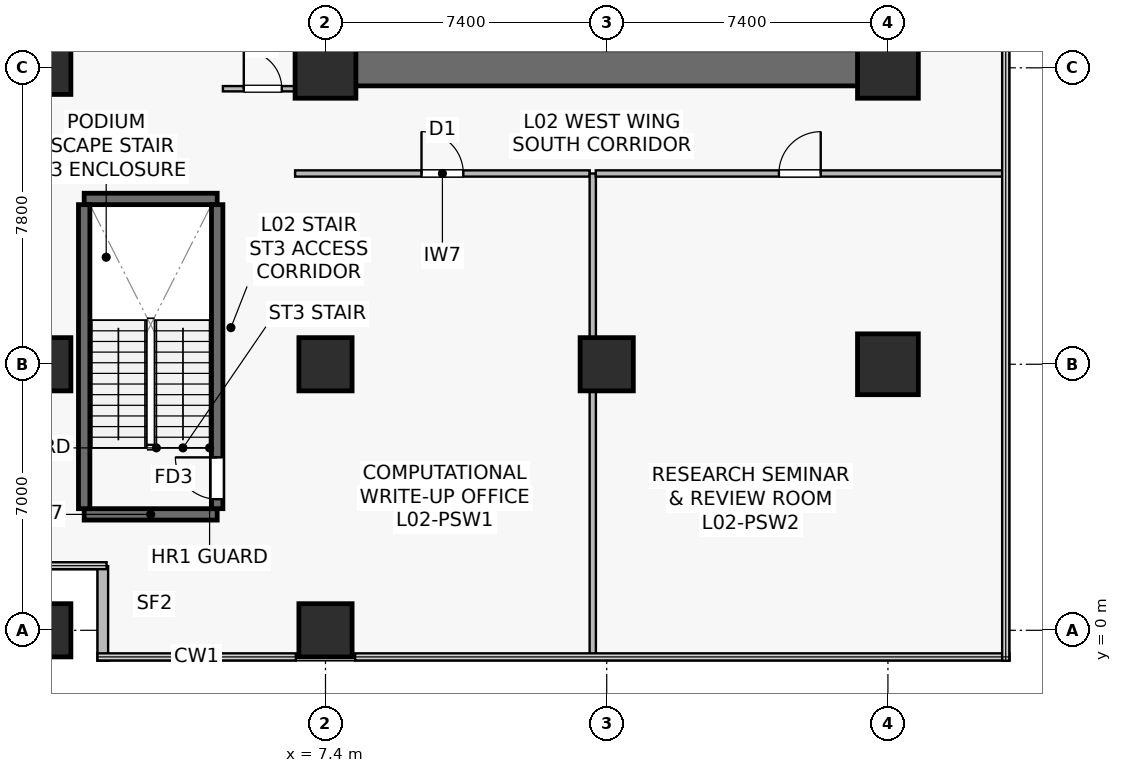
"""IFC4 building model, lengths in metres.
Left out: names, types, materials, properties, quantities, classifications, styles, units other than length and angle.
Written with IfcOpenShell. Run it as: python <this file> out.ifc"""

import sys

from ifc_helpers import new_model, si_unit, direction, frame, frame_2d, origin, origin_2d, place, context, subcontext, project, spatial, rectangle, extrude, source, transform, mapped, element, fill, save


model = new_model("IFC4")
c1 = context("Model", 3, precision=1e-05, world=origin(), true_north=direction((0.0, 1.0)))
c2 = subcontext(c1, "Body", "Model", "MODEL_VIEW")
j1 = project(units=[si_unit("LENGTHUNIT", "METRE"), si_unit("PLANEANGLEUNIT", "RADIAN")], contexts=[c1])
p1 = place(None, origin())
s1 = spatial("IfcSite", under=j1, at=p1, CompositionType="ELEMENT")
p2 = place(p1, origin())
s2 = spatial("IfcBuilding", under=s1, at=p2, CompositionType="ELEMENT")
p3 = place(p2, frame((0.0, 0.0, 5.4)))
s3 = spatial("IfcBuildingStorey", under=s2, at=p3, CompositionType="ELEMENT", Elevation=5.4)
p4 = place(p3, frame((6.925, 14.8, 0.0), z_axis=(0.0, 0.0, 1.0), x_axis=(1.0, 0.0, 0.0)))
e1 = element("IfcWall", 1, at=p4, inside=s3, PredefinedType="SHEAR", context=c2, shape_type="SweptSolid", body=[
    extrude(rectangle(XDim=15.75, YDim=0.95, at=frame_2d((7.875, 0.0))), origin(), (0.0, 0.0, 1.0), 4.45),
])
for number, where, z_axis, x_axis in (
    (2, (1.05, 3.05, 0.0), (0.0, 0.0, 1.0), (1.0, 0.0, 0.0)),
    (3, (1.05, 11.35, 0.0), (0.0, 0.0, 1.0), (1.0, 0.0, 0.0)),
):
    element("IfcWall", number, at=place(p3, frame(where, z_axis=z_axis, x_axis=x_axis)), inside=s3, PredefinedType="SHEAR", context=c2, shape_type="SweptSolid", body=[
        extrude(rectangle(XDim=3.5, YDim=0.3, at=frame_2d((1.75, 0.0))), origin(), (0.0, 0.0, 1.0), 4.45),
    ])
p5 = place(p3, frame((1.05, 3.2, 0.0), z_axis=(0.0, 0.0, 1.0), x_axis=(0.0, 1.0, 0.0)))
e4 = element("IfcWall", 4, at=p5, inside=s3, PredefinedType="SHEAR", context=c2, shape_type="SweptSolid", body=[
    extrude(rectangle(XDim=8.0, YDim=0.3, at=frame_2d((4.0, 0.0))), origin(), (0.0, 0.0, 1.0), 4.45),
])
p6 = place(p3, frame((4.55, 3.2, 0.0), z_axis=(0.0, 0.0, 1.0), x_axis=(0.0, 1.0, 0.0)))
e5 = element("IfcWall", 5, at=p6, inside=s3, PredefinedType="SHEAR", context=c2, shape_type="SweptSolid", body=[
    extrude(rectangle(XDim=8.0, YDim=0.3, at=frame_2d((4.0, 0.0))), origin(), (0.0, 0.0, 1.0), 4.45),
])
p7 = place(p6, frame((0.25, 0.0, 0.0)))
e6 = element("IfcOpeningElement", 6, at=p7, cuts=e5, PredefinedType="OPENING", context=c2, shape_type="SweptSolid", body=[
    extrude(rectangle(XDim=1.1, YDim=2.15, at=frame_2d((0.55, 1.075))), frame((0.0, 0.16, 0.0), z_axis=(0.0, -1.0, 0.0), x_axis=(1.0, 0.0, 0.0)), (0.0, 0.0, 1.0), 0.32),
])
m1 = source(origin(), c2, "Body", "SweptSolid", [
    extrude(rectangle(XDim=1.4, YDim=1.4, at=origin_2d()), origin(), (0.0, 0.0, 1.0), 4.8),
])
p8 = place(p3, frame((14.8, 7.0, 0.0), z_axis=(0.0, 0.0, 1.0), x_axis=(1.0, 0.0, 0.0)))
e7 = element("IfcColumn", 7, at=p8, inside=s3, PredefinedType="COLUMN", context=c2, shape_type="MappedRepresentation", body=[
    mapped(m1, transform((0.0, 0.0, 0.0), scale=1.0)),
])
m2 = source(origin(), c2, "Body", "SweptSolid", [
    extrude(rectangle(XDim=1.6, YDim=1.6, at=origin_2d()), origin(), (0.0, 0.0, 1.0), 4.8),
])
for number, where, z_axis, x_axis in (
    (8, (22.2, 7.0, 0.0), (0.0, 0.0, 1.0), (1.0, 0.0, 0.0)),
    (9, (7.4, 14.8, 0.0), (0.0, 0.0, 1.0), (1.0, 0.0, 0.0)),
    (10, (22.2, 14.8, 0.0), (0.0, 0.0, 1.0), (1.0, 0.0, 0.0)),
):
    element("IfcColumn", number, at=place(p3, frame(where, z_axis=z_axis, x_axis=x_axis)), inside=s3, PredefinedType="COLUMN", context=c2, shape_type="MappedRepresentation", body=[
        mapped(m2, transform((0.0, 0.0, 0.0), scale=1.0)),
    ])
for number, where, z_axis, x_axis in (
    (11, (7.4, 7.0, 0.0), (0.0, 0.0, 1.0), (1.0, 0.0, 0.0)),
    (12, (0.0, 7.0, 0.0), (0.0, 0.0, 1.0), (1.0, 0.0, 0.0)),
    (13, (0.0, 14.8, 0.0), (0.0, 0.0, 1.0), (1.0, 0.0, 0.0)),
    (14, (0.0, 0.0, 0.0), (0.0, 0.0, 1.0), (1.0, 0.0, 0.0)),
    (15, (7.4, 0.0, 0.0), (0.0, 0.0, 1.0), (1.0, 0.0, 0.0)),
):
    element("IfcColumn", number, at=place(p3, frame(where, z_axis=z_axis, x_axis=x_axis)), inside=s3, PredefinedType="COLUMN", context=c2, shape_type="MappedRepresentation", body=[
        mapped(m1, transform((0.0, 0.0, 0.0), scale=1.0)),
    ])
p9 = place(p3, frame((1.54, 1.688, 0.0), z_axis=(0.0, 0.0, 1.0), x_axis=(0.0, -1.0, 0.0)))
e16 = element("IfcWall", 16, at=p9, inside=s3, PredefinedType="STANDARD", context=c2, shape_type="SweptSolid", body=[
    extrude(rectangle(XDim=2.488, YDim=0.28, at=frame_2d((1.244, 0.0))), origin(), (0.0, 0.0, 1.0), 4.45),
])
p10 = place(p3, frame((4.7, 14.25, 0.0), z_axis=(0.0, 0.0, 1.0), x_axis=(1.0, 0.0, 0.0)))
e17 = element("IfcWall", 17, at=p10, inside=s3, PredefinedType="PARTITIONING", context=c2, shape_type="SweptSolid", body=[
    extrude(rectangle(XDim=2.1, YDim=0.14, at=frame_2d((1.05, 0.0))), origin(), (0.0, 0.0, 1.0), 4.45),
])
p11 = place(p10, frame((0.55, 0.0, 0.0)))
e18 = element("IfcOpeningElement", 18, at=p11, cuts=e17, PredefinedType="OPENING", context=c2, shape_type="SweptSolid", body=[
    extrude(rectangle(XDim=1.0, YDim=2.15, at=frame_2d((0.5, 1.075))), frame((0.0, 0.08, 0.0), z_axis=(0.0, -1.0, 0.0), x_axis=(1.0, 0.0, 0.0)), (0.0, 0.0, 1.0), 0.16),
])
p12 = place(p3, frame((6.6, 12.02, 0.0), z_axis=(0.0, 0.0, 1.0), x_axis=(1.0, 0.0, 0.0)))
e19 = element("IfcWall", 19, at=p12, inside=s3, PredefinedType="PARTITIONING", context=c2, shape_type="SweptSolid", body=[
    extrude(rectangle(XDim=7.753, YDim=0.165, at=frame_2d((3.876, 0.0))), origin(), (0.0, 0.0, 1.0), 3.735),
])
p13 = place(p12, frame((3.326, 0.0, 0.0)))
e20 = element("IfcOpeningElement", 20, at=p13, cuts=e19, PredefinedType="OPENING", context=c2, shape_type="SweptSolid", body=[
    extrude(rectangle(XDim=1.1, YDim=2.18, at=frame_2d((0.55, 1.09))), frame((0.0, 0.093, 0.0), z_axis=(0.0, -1.0, 0.0), x_axis=(1.0, 0.0, 0.0)), (0.0, 0.0, 1.0), 0.185),
])
p14 = place(p3, frame((14.433, -0.69, 0.0), z_axis=(0.0, 0.0, 1.0), x_axis=(0.0, 1.0, 0.0)))
e21 = element("IfcWall", 21, at=p14, inside=s3, PredefinedType="PARTITIONING", context=c2, shape_type="SweptSolid", body=[
    extrude(rectangle(XDim=12.71, YDim=0.165, at=frame_2d((6.355, 0.0))), origin(), (0.0, 0.0, 1.0), 3.635),
])
p15 = place(p3, frame((14.513, 12.02, 0.0), z_axis=(0.0, 0.0, 1.0), x_axis=(1.0, 0.0, 0.0)))
e22 = element("IfcWall", 22, at=p15, inside=s3, PredefinedType="PARTITIONING", context=c2, shape_type="SweptSolid", body=[
    extrude(rectangle(XDim=10.737, YDim=0.165, at=frame_2d((5.369, 0.0))), origin(), (0.0, 0.0, 1.0), 3.735),
])
p16 = place(p15, frame((4.819, 0.0, 0.0)))
e23 = element("IfcOpeningElement", 23, at=p16, cuts=e22, PredefinedType="OPENING", context=c2, shape_type="SweptSolid", body=[
    extrude(rectangle(XDim=1.1, YDim=2.18, at=frame_2d((0.55, 1.09))), frame((0.0, 0.093, 0.0), z_axis=(0.0, -1.0, 0.0), x_axis=(1.0, 0.0, 0.0)), (0.0, 0.0, 1.0), 0.185),
])
m3 = source(origin(), c2, "Body", "SweptSolid", [
    extrude(rectangle(XDim=1.1, YDim=2.15, at=frame_2d((0.55, 1.075))), frame((0.0, 0.025, 0.0), z_axis=(0.0, -1.0, 0.0), x_axis=(1.0, 0.0, 0.0)), (0.0, 0.0, 1.0), 0.05),
])
p17 = place(p7, origin())
e24 = element("IfcDoor", 24, at=p17, inside=s3, OperationType="SINGLE_SWING_RIGHT", PredefinedType="DOOR", context=c2, shape_type="MappedRepresentation", body=[
    mapped(m3, transform((0.0, 0.0, 0.0), scale=1.0)),
])
fill(e6, e24)
m4 = source(origin(), c2, "Body", "SweptSolid", [
    extrude(rectangle(XDim=1.0, YDim=2.15, at=frame_2d((0.5, 1.075))), frame((0.0, 0.025, 0.0), z_axis=(0.0, -1.0, 0.0), x_axis=(1.0, 0.0, 0.0)), (0.0, 0.0, 1.0), 0.05),
])
p18 = place(p11, origin())
e25 = element("IfcDoor", 25, at=p18, inside=s3, OperationType="SINGLE_SWING_LEFT", PredefinedType="DOOR", context=c2, shape_type="MappedRepresentation", body=[
    mapped(m4, transform((0.0, 0.0, 0.0), scale=1.0)),
])
fill(e18, e25)
m5 = source(origin(), c2, "Body", "SweptSolid", [
    extrude(rectangle(XDim=1.1, YDim=2.18, at=frame_2d((0.55, 1.09))), frame((0.0, 0.025, 0.0), z_axis=(0.0, -1.0, 0.0), x_axis=(1.0, 0.0, 0.0)), (0.0, 0.0, 1.0), 0.05),
])
p19 = place(p13, origin())
e26 = element("IfcDoor", 26, at=p19, inside=s3, OperationType="SINGLE_SWING_LEFT", PredefinedType="DOOR", context=c2, shape_type="MappedRepresentation", body=[
    mapped(m5, transform((0.0, 0.0, 0.0), scale=1.0)),
])
fill(e20, e26)
p20 = place(p16, origin())
e27 = element("IfcDoor", 27, at=p20, inside=s3, OperationType="SINGLE_SWING_RIGHT", PredefinedType="DOOR", context=c2, shape_type="MappedRepresentation", body=[
    mapped(m5, transform((0.0, 0.0, 0.0), scale=1.0)),
])
fill(e23, e27)
save(model, sys.argv[1])
